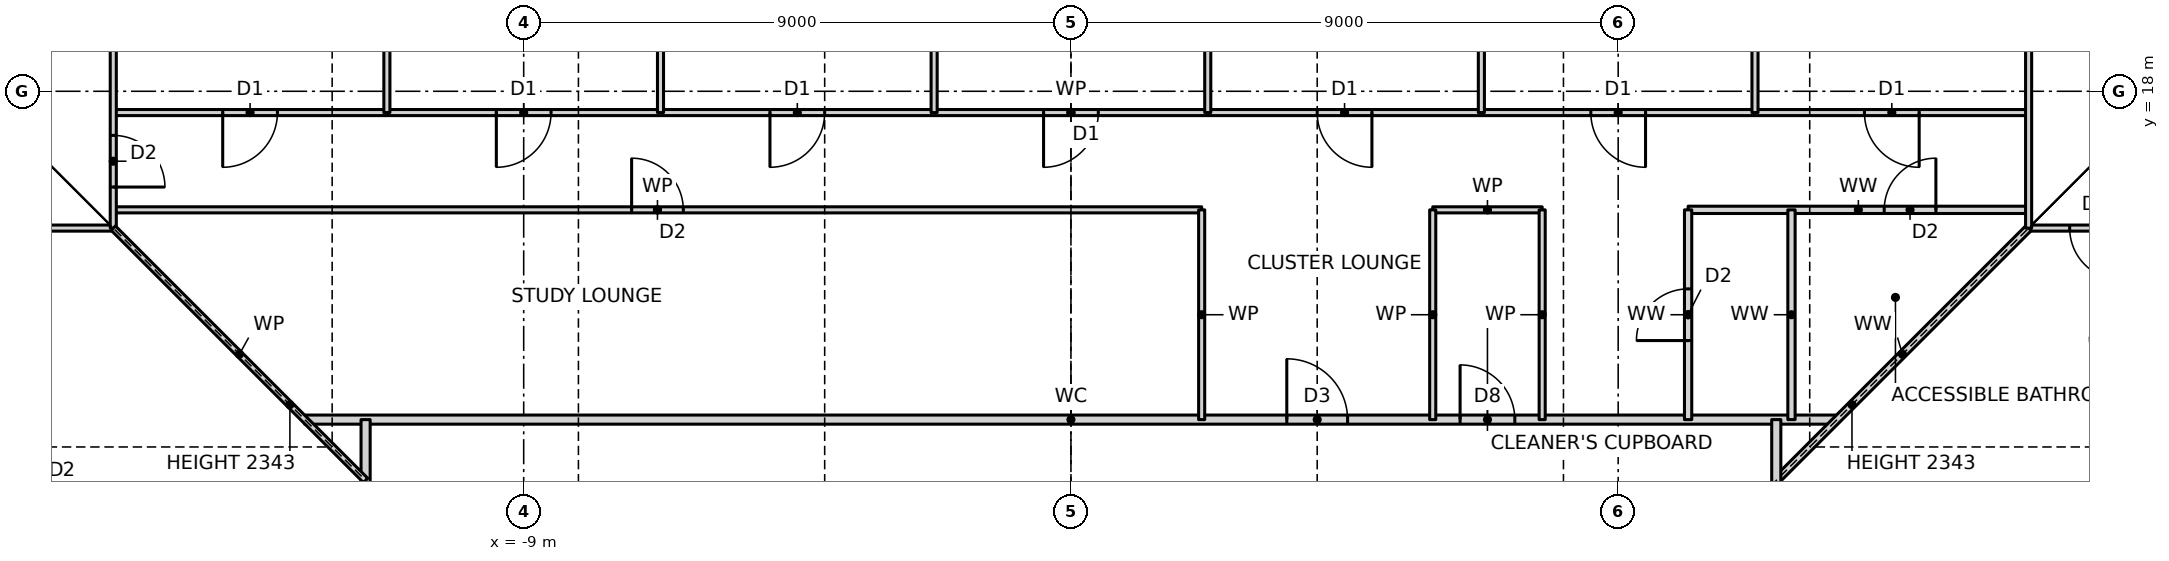
"""IFC4 building model, lengths in metres.
Left out: names, types, materials, properties, quantities, classifications, styles, units other than length and angle.
Written with IfcOpenShell. Run it as: python <this file> out.ifc"""

import sys

from ifc_helpers import new_model, si_unit, direction, frame, frame_2d, origin, place, context, subcontext, project, spatial, rectangle, extrude, element, fill, save


model = new_model("IFC4")
c1 = context("Model", 3, precision=1e-05, world=origin(), true_north=direction((0.0, 1.0)))
c2 = subcontext(c1, "Body", "Model", "MODEL_VIEW")
j1 = project(units=[si_unit("LENGTHUNIT", "METRE"), si_unit("PLANEANGLEUNIT", "RADIAN")], contexts=[c1])
p1 = place(None, origin())
s1 = spatial("IfcSite", under=j1, at=p1, CompositionType="ELEMENT")
p2 = place(p1, origin())
s2 = spatial("IfcBuilding", under=s1, at=p2, CompositionType="ELEMENT")
p3 = place(p2, frame((0.0, 0.0, 39.5)))
s3 = spatial("IfcBuildingStorey", under=s2, at=p3, CompositionType="ELEMENT", Elevation=39.5)
p4 = place(p3, frame((-12.6, 12.6, 0.0), z_axis=(0.0, 0.0, 1.0), x_axis=(1.0, 0.0, 0.0)))
e1 = element("IfcWall", 1, at=p4, inside=s3, PredefinedType="PARTITIONING", context=c2, shape_type="SweptSolid", body=[
    extrude(rectangle(XDim=25.2, YDim=0.15, at=frame_2d((12.6, 0.0))), origin(), (0.0, 0.0, 1.0), 3.27),
])
p5 = place(p4, frame((16.15, 0.0, 0.0)))
e2 = element("IfcOpeningElement", 2, at=p5, cuts=e1, PredefinedType="OPENING", context=c2, shape_type="SweptSolid", body=[
    extrude(rectangle(XDim=1.0, YDim=2.1, at=frame_2d((0.5, 1.05))), frame((0.0, 0.085, 0.0), z_axis=(0.0, -1.0, 0.0), x_axis=(1.0, 0.0, 0.0)), (0.0, 0.0, 1.0), 0.17),
])
p6 = place(p4, frame((19.0, 0.0, 0.0)))
e3 = element("IfcOpeningElement", 3, at=p6, cuts=e1, PredefinedType="OPENING", context=c2, shape_type="SweptSolid", body=[
    extrude(rectangle(XDim=0.9, YDim=2.1, at=frame_2d((0.45, 1.05))), frame((0.0, 0.085, 0.0), z_axis=(0.0, -1.0, 0.0), x_axis=(1.0, 0.0, 0.0)), (0.0, 0.0, 1.0), 0.17),
])
p7 = place(p3, frame((-23.19, 15.75, 0.0), z_axis=(0.0, 0.0, 1.0), x_axis=(1.0, 0.0, 0.0)))
e4 = element("IfcWall", 4, at=p7, inside=s3, PredefinedType="PARTITIONING", context=c2, shape_type="SweptSolid", body=[
    extrude(rectangle(XDim=7.44, YDim=0.1, at=frame_2d((3.72, 0.0))), origin(), (0.0, 0.0, 1.0), 3.27),
])
p8 = place(p3, frame((15.75, 15.75, 0.0), z_axis=(0.0, 0.0, 1.0), x_axis=(1.0, 0.0, 0.0)))
e5 = element("IfcWall", 5, at=p8, inside=s3, PredefinedType="PARTITIONING", context=c2, shape_type="SweptSolid", body=[
    extrude(rectangle(XDim=7.44, YDim=0.1, at=frame_2d((3.72, 0.0))), origin(), (0.0, 0.0, 1.0), 3.27),
])
p9 = place(p8, frame((0.675, 0.0, 0.0)))
e6 = element("IfcOpeningElement", 6, at=p9, cuts=e5, PredefinedType="OPENING", context=c2, shape_type="SweptSolid", body=[
    extrude(rectangle(XDim=0.85, YDim=2.1, at=frame_2d((0.425, 1.05))), frame((0.0, 0.06, 0.0), z_axis=(0.0, -1.0, 0.0), x_axis=(1.0, 0.0, 0.0)), (0.0, 0.0, 1.0), 0.12),
])
p10 = place(p3, frame((-15.75, 16.05, 0.0), z_axis=(0.0, 0.0, 1.0), x_axis=(1.0, 0.0, 0.0)))
e7 = element("IfcWall", 7, at=p10, inside=s3, PredefinedType="PARTITIONING", context=c2, shape_type="SweptSolid", body=[
    extrude(rectangle(XDim=17.9, YDim=0.1, at=frame_2d((8.95, 0.0))), origin(), (0.0, 0.0, 1.0), 3.27),
])
p11 = place(p10, frame((8.525, 0.0, 0.0)))
e8 = element("IfcOpeningElement", 8, at=p11, cuts=e7, PredefinedType="OPENING", context=c2, shape_type="SweptSolid", body=[
    extrude(rectangle(XDim=0.85, YDim=2.1, at=frame_2d((0.425, 1.05))), frame((0.0, 0.06, 0.0), z_axis=(0.0, -1.0, 0.0), x_axis=(1.0, 0.0, 0.0)), (0.0, 0.0, 1.0), 0.12),
])
p12 = place(p3, frame((5.95, 16.05, 0.0), z_axis=(0.0, 0.0, 1.0), x_axis=(1.0, 0.0, 0.0)))
e9 = element("IfcWall", 9, at=p12, inside=s3, PredefinedType="PARTITIONING", context=c2, shape_type="SweptSolid", body=[
    extrude(rectangle(XDim=1.8, YDim=0.1, at=frame_2d((0.9, 0.0))), origin(), (0.0, 0.0, 1.0), 3.27),
])
p13 = place(p3, frame((10.15, 16.05, 0.0), z_axis=(0.0, 0.0, 1.0), x_axis=(1.0, 0.0, 0.0)))
e10 = element("IfcWall", 10, at=p13, inside=s3, PredefinedType="PARTITIONING", context=c2, shape_type="SweptSolid", body=[
    extrude(rectangle(XDim=5.6, YDim=0.12, at=frame_2d((2.8, 0.0))), origin(), (0.0, 0.0, 1.0), 3.27),
])
p14 = place(p13, frame((3.225, 0.0, 0.0)))
e11 = element("IfcOpeningElement", 11, at=p14, cuts=e10, PredefinedType="OPENING", context=c2, shape_type="SweptSolid", body=[
    extrude(rectangle(XDim=0.85, YDim=2.1, at=frame_2d((0.425, 1.05))), frame((0.0, 0.07, 0.0), z_axis=(0.0, -1.0, 0.0), x_axis=(1.0, 0.0, 0.0)), (0.0, 0.0, 1.0), 0.14),
])
p15 = place(p3, frame((-15.75, 17.65, 0.0), z_axis=(0.0, 0.0, 1.0), x_axis=(1.0, 0.0, 0.0)))
e12 = element("IfcWall", 12, at=p15, inside=s3, PredefinedType="PARTITIONING", context=c2, shape_type="SweptSolid", body=[
    extrude(rectangle(XDim=31.5, YDim=0.1, at=frame_2d((15.75, 0.0))), origin(), (0.0, 0.0, 1.0), 3.27),
])
p16 = place(p15, frame((28.8, 0.0, 0.0)))
e13 = element("IfcOpeningElement", 13, at=p16, cuts=e12, PredefinedType="OPENING", context=c2, shape_type="SweptSolid", body=[
    extrude(rectangle(XDim=0.9, YDim=2.1, at=frame_2d((0.45, 1.05))), frame((0.0, 0.06, 0.0), z_axis=(0.0, -1.0, 0.0), x_axis=(1.0, 0.0, 0.0)), (0.0, 0.0, 1.0), 0.12),
])
p17 = place(p15, frame((24.3, 0.0, 0.0)))
e14 = element("IfcOpeningElement", 14, at=p17, cuts=e12, PredefinedType="OPENING", context=c2, shape_type="SweptSolid", body=[
    extrude(rectangle(XDim=0.9, YDim=2.1, at=frame_2d((0.45, 1.05))), frame((0.0, 0.06, 0.0), z_axis=(0.0, -1.0, 0.0), x_axis=(1.0, 0.0, 0.0)), (0.0, 0.0, 1.0), 0.12),
])
p18 = place(p15, frame((19.8, 0.0, 0.0)))
e15 = element("IfcOpeningElement", 15, at=p18, cuts=e12, PredefinedType="OPENING", context=c2, shape_type="SweptSolid", body=[
    extrude(rectangle(XDim=0.9, YDim=2.1, at=frame_2d((0.45, 1.05))), frame((0.0, 0.06, 0.0), z_axis=(0.0, -1.0, 0.0), x_axis=(1.0, 0.0, 0.0)), (0.0, 0.0, 1.0), 0.12),
])
p19 = place(p15, frame((15.3, 0.0, 0.0)))
e16 = element("IfcOpeningElement", 16, at=p19, cuts=e12, PredefinedType="OPENING", context=c2, shape_type="SweptSolid", body=[
    extrude(rectangle(XDim=0.9, YDim=2.1, at=frame_2d((0.45, 1.05))), frame((0.0, 0.06, 0.0), z_axis=(0.0, -1.0, 0.0), x_axis=(1.0, 0.0, 0.0)), (0.0, 0.0, 1.0), 0.12),
])
p20 = place(p15, frame((10.8, 0.0, 0.0)))
e17 = element("IfcOpeningElement", 17, at=p20, cuts=e12, PredefinedType="OPENING", context=c2, shape_type="SweptSolid", body=[
    extrude(rectangle(XDim=0.9, YDim=2.1, at=frame_2d((0.45, 1.05))), frame((0.0, 0.06, 0.0), z_axis=(0.0, -1.0, 0.0), x_axis=(1.0, 0.0, 0.0)), (0.0, 0.0, 1.0), 0.12),
])
p21 = place(p15, frame((6.3, 0.0, 0.0)))
e18 = element("IfcOpeningElement", 18, at=p21, cuts=e12, PredefinedType="OPENING", context=c2, shape_type="SweptSolid", body=[
    extrude(rectangle(XDim=0.9, YDim=2.1, at=frame_2d((0.45, 1.05))), frame((0.0, 0.06, 0.0), z_axis=(0.0, -1.0, 0.0), x_axis=(1.0, 0.0, 0.0)), (0.0, 0.0, 1.0), 0.12),
])
p22 = place(p15, frame((1.8, 0.0, 0.0)))
e19 = element("IfcOpeningElement", 19, at=p22, cuts=e12, PredefinedType="OPENING", context=c2, shape_type="SweptSolid", body=[
    extrude(rectangle(XDim=0.9, YDim=2.1, at=frame_2d((0.45, 1.05))), frame((0.0, 0.06, 0.0), z_axis=(0.0, -1.0, 0.0), x_axis=(1.0, 0.0, 0.0)), (0.0, 0.0, 1.0), 0.12),
])
p23 = place(p3, frame((11.6, 11.6, 0.0), z_axis=(0.0, 0.0, 1.0), x_axis=(0.707106781187, 0.707106781187, 0.0)))
e20 = element("IfcWall", 20, at=p23, inside=s3, PredefinedType="PARTITIONING", context=c2, shape_type="SweptSolid", body=[
    extrude(rectangle(XDim=5.869, YDim=0.12, at=frame_2d((2.935, 0.0))), origin(), (0.0, 0.0, 1.0), 2.343),
])
p24 = place(p3, frame((15.75, 15.75, 0.0), z_axis=(0.0, 0.0, 1.0), x_axis=(0.0, 1.0, 0.0)))
e21 = element("IfcWall", 21, at=p24, inside=s3, PredefinedType="PARTITIONING", context=c2, shape_type="SweptSolid", body=[
    extrude(rectangle(XDim=7.44, YDim=0.1, at=frame_2d((3.72, 0.0))), origin(), (0.0, 0.0, 1.0), 3.27),
])
p25 = place(p3, frame((11.85, 12.6, 0.0), z_axis=(0.0, 0.0, 1.0), x_axis=(0.0, 1.0, 0.0)))
e22 = element("IfcWall", 22, at=p25, inside=s3, PredefinedType="PARTITIONING", context=c2, shape_type="SweptSolid", body=[
    extrude(rectangle(XDim=3.45, YDim=0.12, at=frame_2d((1.725, 0.0))), origin(), (0.0, 0.0, 1.0), 3.27),
])
p26 = place(p3, frame((11.6, -11.6, 0.0), z_axis=(0.0, 0.0, 1.0), x_axis=(0.0, 1.0, 0.0)))
e23 = element("IfcWall", 23, at=p26, inside=s3, PredefinedType="PARTITIONING", context=c2, shape_type="SweptSolid", body=[
    extrude(rectangle(XDim=24.2, YDim=0.15, at=frame_2d((12.1, 0.0))), origin(), (0.0, 0.0, 1.0), 3.27),
])
p27 = place(p26, frame((3.6, 0.0, 0.0)))
e24 = element("IfcOpeningElement", 24, at=p27, cuts=e23, PredefinedType="OPENING", context=c2, shape_type="SweptSolid", body=[
    extrude(rectangle(XDim=1.0, YDim=2.1, at=frame_2d((0.5, 1.05))), frame((0.0, 0.085, 0.0), z_axis=(0.0, -1.0, 0.0), x_axis=(1.0, 0.0, 0.0)), (0.0, 0.0, 1.0), 0.17),
])
p28 = place(p26, frame((21.025, 0.0, 0.0)))
e25 = element("IfcOpeningElement", 25, at=p28, cuts=e23, PredefinedType="OPENING", context=c2, shape_type="SweptSolid", body=[
    extrude(rectangle(XDim=1.0, YDim=2.1, at=frame_2d((0.5, 1.05))), frame((0.0, 0.085, 0.0), z_axis=(0.0, -1.0, 0.0), x_axis=(1.0, 0.0, 0.0)), (0.0, 0.0, 1.0), 0.17),
])
p29 = place(p3, frame((11.25, 17.65, 0.0), z_axis=(0.0, 0.0, 1.0), x_axis=(0.0, 1.0, 0.0)))
e26 = element("IfcWall", 26, at=p29, inside=s3, PredefinedType="PARTITIONING", context=c2, shape_type="SweptSolid", body=[
    extrude(rectangle(XDim=5.54, YDim=0.1, at=frame_2d((2.77, 0.0))), origin(), (0.0, 0.0, 1.0), 3.27),
])
p30 = place(p3, frame((10.15, 12.6, 0.0), z_axis=(0.0, 0.0, 1.0), x_axis=(0.0, 1.0, 0.0)))
e27 = element("IfcWall", 27, at=p30, inside=s3, PredefinedType="PARTITIONING", context=c2, shape_type="SweptSolid", body=[
    extrude(rectangle(XDim=3.45, YDim=0.12, at=frame_2d((1.725, 0.0))), origin(), (0.0, 0.0, 1.0), 3.27),
])
p31 = place(p30, frame((1.3, 0.0, 0.0)))
e28 = element("IfcOpeningElement", 28, at=p31, cuts=e27, PredefinedType="OPENING", context=c2, shape_type="SweptSolid", body=[
    extrude(rectangle(XDim=0.85, YDim=2.1, at=frame_2d((0.425, 1.05))), frame((0.0, 0.07, 0.0), z_axis=(0.0, -1.0, 0.0), x_axis=(1.0, 0.0, 0.0)), (0.0, 0.0, 1.0), 0.14),
])
p32 = place(p3, frame((7.75, 12.6, 0.0), z_axis=(0.0, 0.0, 1.0), x_axis=(0.0, 1.0, 0.0)))
e29 = element("IfcWall", 29, at=p32, inside=s3, PredefinedType="PARTITIONING", context=c2, shape_type="SweptSolid", body=[
    extrude(rectangle(XDim=3.45, YDim=0.1, at=frame_2d((1.725, 0.0))), origin(), (0.0, 0.0, 1.0), 3.27),
])
p33 = place(p3, frame((6.75, 17.65, 0.0), z_axis=(0.0, 0.0, 1.0), x_axis=(0.0, 1.0, 0.0)))
e30 = element("IfcWall", 30, at=p33, inside=s3, PredefinedType="PARTITIONING", context=c2, shape_type="SweptSolid", body=[
    extrude(rectangle(XDim=5.54, YDim=0.1, at=frame_2d((2.77, 0.0))), origin(), (0.0, 0.0, 1.0), 3.27),
])
p34 = place(p3, frame((5.95, 12.6, 0.0), z_axis=(0.0, 0.0, 1.0), x_axis=(0.0, 1.0, 0.0)))
e31 = element("IfcWall", 31, at=p34, inside=s3, PredefinedType="PARTITIONING", context=c2, shape_type="SweptSolid", body=[
    extrude(rectangle(XDim=3.45, YDim=0.1, at=frame_2d((1.725, 0.0))), origin(), (0.0, 0.0, 1.0), 3.27),
])
p35 = place(p3, frame((2.25, 17.65, 0.0), z_axis=(0.0, 0.0, 1.0), x_axis=(0.0, 1.0, 0.0)))
e32 = element("IfcWall", 32, at=p35, inside=s3, PredefinedType="PARTITIONING", context=c2, shape_type="SweptSolid", body=[
    extrude(rectangle(XDim=5.54, YDim=0.1, at=frame_2d((2.77, 0.0))), origin(), (0.0, 0.0, 1.0), 3.27),
])
p36 = place(p3, frame((2.15, 12.6, 0.0), z_axis=(0.0, 0.0, 1.0), x_axis=(0.0, 1.0, 0.0)))
e33 = element("IfcWall", 33, at=p36, inside=s3, PredefinedType="PARTITIONING", context=c2, shape_type="SweptSolid", body=[
    extrude(rectangle(XDim=3.45, YDim=0.1, at=frame_2d((1.725, 0.0))), origin(), (0.0, 0.0, 1.0), 3.27),
])
for number, where, z_axis, x_axis in (
    (34, (-2.25, 17.65, 0.0), (0.0, 0.0, 1.0), (0.0, 1.0, 0.0)),
    (35, (-6.75, 17.65, 0.0), (0.0, 0.0, 1.0), (0.0, 1.0, 0.0)),
    (36, (-11.25, 17.65, 0.0), (0.0, 0.0, 1.0), (0.0, 1.0, 0.0)),
):
    element("IfcWall", number, at=place(p3, frame(where, z_axis=z_axis, x_axis=x_axis)), inside=s3, PredefinedType="PARTITIONING", context=c2, shape_type="SweptSolid", body=[
        extrude(rectangle(XDim=5.54, YDim=0.1, at=frame_2d((2.77, 0.0))), origin(), (0.0, 0.0, 1.0), 3.27),
    ])
p37 = place(p3, frame((-11.6, -11.6, 0.0), z_axis=(0.0, 0.0, 1.0), x_axis=(0.0, 1.0, 0.0)))
e37 = element("IfcWall", 37, at=p37, inside=s3, PredefinedType="PARTITIONING", context=c2, shape_type="SweptSolid", body=[
    extrude(rectangle(XDim=24.2, YDim=0.15, at=frame_2d((12.1, 0.0))), origin(), (0.0, 0.0, 1.0), 3.27),
])
p38 = place(p37, frame((12.14, 0.0, 0.0)))
e38 = element("IfcOpeningElement", 38, at=p38, cuts=e37, PredefinedType="OPENING", context=c2, shape_type="SweptSolid", body=[
    extrude(rectangle(XDim=1.0, YDim=2.1, at=frame_2d((0.5, 1.05))), frame((0.0, 0.085, 0.0), z_axis=(0.0, -1.0, 0.0), x_axis=(1.0, 0.0, 0.0)), (0.0, 0.0, 1.0), 0.17),
])
p39 = place(p3, frame((-15.75, 15.75, 0.0), z_axis=(0.0, 0.0, 1.0), x_axis=(0.0, 1.0, 0.0)))
e39 = element("IfcWall", 39, at=p39, inside=s3, PredefinedType="PARTITIONING", context=c2, shape_type="SweptSolid", body=[
    extrude(rectangle(XDim=7.44, YDim=0.1, at=frame_2d((3.72, 0.0))), origin(), (0.0, 0.0, 1.0), 3.27),
])
p40 = place(p39, frame((0.675, 0.0, 0.0)))
e40 = element("IfcOpeningElement", 40, at=p40, cuts=e39, PredefinedType="OPENING", context=c2, shape_type="SweptSolid", body=[
    extrude(rectangle(XDim=0.85, YDim=2.1, at=frame_2d((0.425, 1.05))), frame((0.0, 0.06, 0.0), z_axis=(0.0, -1.0, 0.0), x_axis=(1.0, 0.0, 0.0)), (0.0, 0.0, 1.0), 0.12),
])
p41 = place(p3, frame((-11.6, 11.6, 0.0), z_axis=(0.0, 0.0, 1.0), x_axis=(-0.707106781187, 0.707106781187, 0.0)))
e41 = element("IfcWall", 41, at=p41, inside=s3, PredefinedType="PARTITIONING", context=c2, shape_type="SweptSolid", body=[
    extrude(rectangle(XDim=5.869, YDim=0.1, at=frame_2d((2.935, 0.0))), origin(), (0.0, 0.0, 1.0), 2.343),
])
p42 = place(p16, frame((0.9, 0.0, 0.0), z_axis=(0.0, 0.0, 1.0), x_axis=(-1.0, 0.0, 0.0)))
e42 = element("IfcDoor", 42, at=p42, inside=s3, OperationType="SINGLE_SWING_LEFT", PredefinedType="DOOR", context=c2, shape_type="SweptSolid", body=[
    extrude(rectangle(XDim=0.9, YDim=2.1, at=frame_2d((0.45, 1.05))), frame((0.0, 0.025, 0.0), z_axis=(0.0, -1.0, 0.0), x_axis=(1.0, 0.0, 0.0)), (0.0, 0.0, 1.0), 0.05),
])
fill(e13, e42)
p43 = place(p17, frame((0.9, 0.0, 0.0), z_axis=(0.0, 0.0, 1.0), x_axis=(-1.0, 0.0, 0.0)))
e43 = element("IfcDoor", 43, at=p43, inside=s3, OperationType="SINGLE_SWING_LEFT", PredefinedType="DOOR", context=c2, shape_type="SweptSolid", body=[
    extrude(rectangle(XDim=0.9, YDim=2.1, at=frame_2d((0.45, 1.05))), frame((0.0, 0.025, 0.0), z_axis=(0.0, -1.0, 0.0), x_axis=(1.0, 0.0, 0.0)), (0.0, 0.0, 1.0), 0.05),
])
fill(e14, e43)
p44 = place(p18, frame((0.9, 0.0, 0.0), z_axis=(0.0, 0.0, 1.0), x_axis=(-1.0, 0.0, 0.0)))
e44 = element("IfcDoor", 44, at=p44, inside=s3, OperationType="SINGLE_SWING_LEFT", PredefinedType="DOOR", context=c2, shape_type="SweptSolid", body=[
    extrude(rectangle(XDim=0.9, YDim=2.1, at=frame_2d((0.45, 1.05))), frame((0.0, 0.025, 0.0), z_axis=(0.0, -1.0, 0.0), x_axis=(1.0, 0.0, 0.0)), (0.0, 0.0, 1.0), 0.05),
])
fill(e15, e44)
p45 = place(p19, frame((0.9, 0.0, 0.0), z_axis=(0.0, 0.0, 1.0), x_axis=(-1.0, 0.0, 0.0)))
e45 = element("IfcDoor", 45, at=p45, inside=s3, OperationType="SINGLE_SWING_RIGHT", PredefinedType="DOOR", context=c2, shape_type="SweptSolid", body=[
    extrude(rectangle(XDim=0.9, YDim=2.1, at=frame_2d((0.45, 1.05))), frame((0.0, 0.025, 0.0), z_axis=(0.0, -1.0, 0.0), x_axis=(1.0, 0.0, 0.0)), (0.0, 0.0, 1.0), 0.05),
])
fill(e16, e45)
p46 = place(p20, frame((0.9, 0.0, 0.0), z_axis=(0.0, 0.0, 1.0), x_axis=(-1.0, 0.0, 0.0)))
e46 = element("IfcDoor", 46, at=p46, inside=s3, OperationType="SINGLE_SWING_RIGHT", PredefinedType="DOOR", context=c2, shape_type="SweptSolid", body=[
    extrude(rectangle(XDim=0.9, YDim=2.1, at=frame_2d((0.45, 1.05))), frame((0.0, 0.025, 0.0), z_axis=(0.0, -1.0, 0.0), x_axis=(1.0, 0.0, 0.0)), (0.0, 0.0, 1.0), 0.05),
])
fill(e17, e46)
p47 = place(p21, frame((0.9, 0.0, 0.0), z_axis=(0.0, 0.0, 1.0), x_axis=(-1.0, 0.0, 0.0)))
e47 = element("IfcDoor", 47, at=p47, inside=s3, OperationType="SINGLE_SWING_RIGHT", PredefinedType="DOOR", context=c2, shape_type="SweptSolid", body=[
    extrude(rectangle(XDim=0.9, YDim=2.1, at=frame_2d((0.45, 1.05))), frame((0.0, 0.025, 0.0), z_axis=(0.0, -1.0, 0.0), x_axis=(1.0, 0.0, 0.0)), (0.0, 0.0, 1.0), 0.05),
])
fill(e18, e47)
p48 = place(p22, frame((0.9, 0.0, 0.0), z_axis=(0.0, 0.0, 1.0), x_axis=(-1.0, 0.0, 0.0)))
e48 = element("IfcDoor", 48, at=p48, inside=s3, OperationType="SINGLE_SWING_RIGHT", PredefinedType="DOOR", context=c2, shape_type="SweptSolid", body=[
    extrude(rectangle(XDim=0.9, YDim=2.1, at=frame_2d((0.45, 1.05))), frame((0.0, 0.025, 0.0), z_axis=(0.0, -1.0, 0.0), x_axis=(1.0, 0.0, 0.0)), (0.0, 0.0, 1.0), 0.05),
])
fill(e19, e48)
p49 = place(p5, origin())
e49 = element("IfcDoor", 49, at=p49, inside=s3, OperationType="SINGLE_SWING_LEFT", PredefinedType="DOOR", context=c2, shape_type="SweptSolid", body=[
    extrude(rectangle(XDim=1.0, YDim=2.1, at=frame_2d((0.5, 1.05))), frame((0.0, 0.025, 0.0), z_axis=(0.0, -1.0, 0.0), x_axis=(1.0, 0.0, 0.0)), (0.0, 0.0, 1.0), 0.05),
])
fill(e2, e49)
p50 = place(p14, origin())
e50 = element("IfcDoor", 50, at=p50, inside=s3, OperationType="SINGLE_SWING_RIGHT", PredefinedType="DOOR", context=c2, shape_type="SweptSolid", body=[
    extrude(rectangle(XDim=0.85, YDim=2.1, at=frame_2d((0.425, 1.05))), frame((0.0, 0.025, 0.0), z_axis=(0.0, -1.0, 0.0), x_axis=(1.0, 0.0, 0.0)), (0.0, 0.0, 1.0), 0.05),
])
fill(e11, e50)
p51 = place(p31, origin())
e51 = element("IfcDoor", 51, at=p51, inside=s3, OperationType="SINGLE_SWING_LEFT", PredefinedType="DOOR", context=c2, shape_type="SweptSolid", body=[
    extrude(rectangle(XDim=0.85, YDim=2.1, at=frame_2d((0.425, 1.05))), frame((0.0, 0.025, 0.0), z_axis=(0.0, -1.0, 0.0), x_axis=(1.0, 0.0, 0.0)), (0.0, 0.0, 1.0), 0.05),
])
fill(e28, e51)
p52 = place(p6, origin())
e52 = element("IfcDoor", 52, at=p52, inside=s3, OperationType="SINGLE_SWING_LEFT", PredefinedType="DOOR", context=c2, shape_type="SweptSolid", body=[
    extrude(rectangle(XDim=0.9, YDim=2.1, at=frame_2d((0.45, 1.05))), frame((0.0, 0.025, 0.0), z_axis=(0.0, -1.0, 0.0), x_axis=(1.0, 0.0, 0.0)), (0.0, 0.0, 1.0), 0.05),
])
fill(e3, e52)
p53 = place(p11, origin())
e53 = element("IfcDoor", 53, at=p53, inside=s3, OperationType="SINGLE_SWING_LEFT", PredefinedType="DOOR", context=c2, shape_type="SweptSolid", body=[
    extrude(rectangle(XDim=0.85, YDim=2.1, at=frame_2d((0.425, 1.05))), frame((0.0, 0.025, 0.0), z_axis=(0.0, -1.0, 0.0), x_axis=(1.0, 0.0, 0.0)), (0.0, 0.0, 1.0), 0.05),
])
fill(e8, e53)
p54 = place(p9, frame((0.85, 0.0, 0.0), z_axis=(0.0, 0.0, 1.0), x_axis=(-1.0, 0.0, 0.0)))
e54 = element("IfcDoor", 54, at=p54, inside=s3, OperationType="SINGLE_SWING_LEFT", PredefinedType="DOOR", context=c2, shape_type="SweptSolid", body=[
    extrude(rectangle(XDim=0.85, YDim=2.1, at=frame_2d((0.425, 1.05))), frame((0.0, 0.025, 0.0), z_axis=(0.0, -1.0, 0.0), x_axis=(1.0, 0.0, 0.0)), (0.0, 0.0, 1.0), 0.05),
])
fill(e6, e54)
p55 = place(p40, frame((0.85, 0.0, 0.0), z_axis=(0.0, 0.0, 1.0), x_axis=(-1.0, 0.0, 0.0)))
e55 = element("IfcDoor", 55, at=p55, inside=s3, OperationType="SINGLE_SWING_RIGHT", PredefinedType="DOOR", context=c2, shape_type="SweptSolid", body=[
    extrude(rectangle(XDim=0.85, YDim=2.1, at=frame_2d((0.425, 1.05))), frame((0.0, 0.025, 0.0), z_axis=(0.0, -1.0, 0.0), x_axis=(1.0, 0.0, 0.0)), (0.0, 0.0, 1.0), 0.05),
])
fill(e40, e55)
save(model, sys.argv[1])
